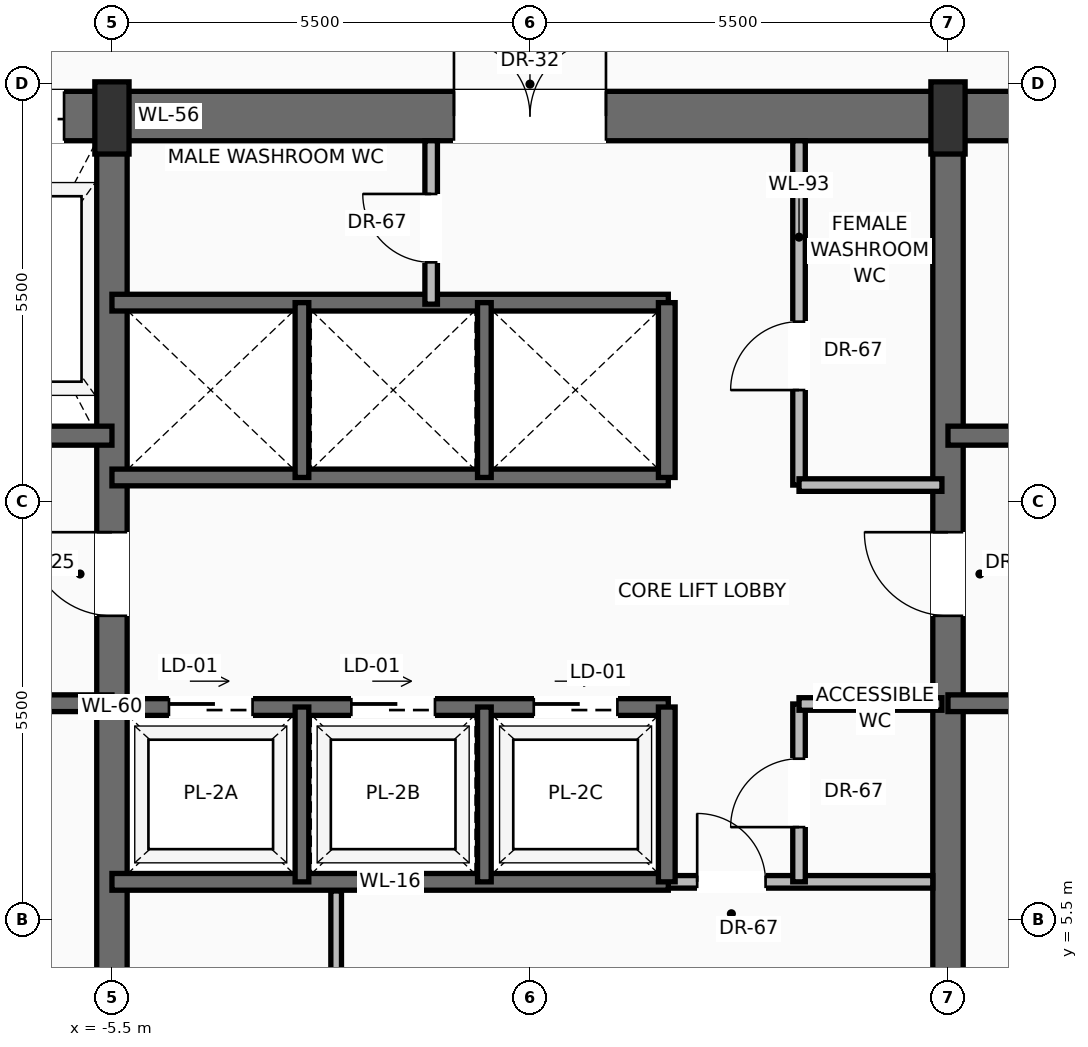
"""IFC4 building model, lengths in metres.
Left out: names, types, materials, properties, quantities, classifications, styles, units other than length and angle.
Written with IfcOpenShell. Run it as: python <this file> out.ifc"""

import sys

from ifc_helpers import new_model, si_unit, direction, frame, frame_2d, origin, origin_2d, place, context, subcontext, project, spatial, rectangle, extrude, source, transform, mapped, element, fill, save


model = new_model("IFC4")
c1 = context("Model", 3, precision=1e-05, world=origin(), true_north=direction((0.0, 1.0)))
c2 = subcontext(c1, "Body", "Model", "MODEL_VIEW")
j1 = project(units=[si_unit("LENGTHUNIT", "METRE"), si_unit("PLANEANGLEUNIT", "RADIAN")], contexts=[c1])
p1 = place(None, origin())
s1 = spatial("IfcSite", under=j1, at=p1, CompositionType="ELEMENT")
p2 = place(p1, origin())
s2 = spatial("IfcBuilding", under=s1, at=p2, CompositionType="ELEMENT")
p3 = place(p2, frame((0.0, 0.0, 129.3)))
s3 = spatial("IfcBuildingStorey", under=s2, at=p3, CompositionType="ELEMENT", Elevation=129.3)
p4 = place(p3, frame((-10.8, 16.075, 0.0), z_axis=(0.0, 0.0, 1.0), x_axis=(1.0, 0.0, 0.0)))
e1 = element("IfcWall", 1, at=p4, inside=s3, PredefinedType="SHEAR", context=c2, shape_type="SweptSolid", body=[
    extrude(rectangle(XDim=21.6, YDim=0.65, at=frame_2d((10.8, 0.0))), origin(), (0.0, 0.0, 1.0), 3.47),
])
p5 = place(p4, frame((3.37, 0.0, 0.0)))
e2 = element("IfcOpeningElement", 2, at=p5, cuts=e1, PredefinedType="OPENING", context=c2, shape_type="SweptSolid", body=[
    extrude(rectangle(XDim=1.3, YDim=2.3, at=frame_2d((0.65, 1.15))), frame((0.0, 0.335, 0.0), z_axis=(0.0, -1.0, 0.0), x_axis=(1.0, 0.0, 0.0)), (0.0, 0.0, 1.0), 0.67),
])
p6 = place(p4, frame((9.8, 0.0, 0.0)))
e3 = element("IfcOpeningElement", 3, at=p6, cuts=e1, PredefinedType="OPENING", context=c2, shape_type="SweptSolid", body=[
    extrude(rectangle(XDim=2.0, YDim=2.4, at=frame_2d((1.0, 1.2))), frame((0.0, 0.335, 0.0), z_axis=(0.0, -1.0, 0.0), x_axis=(1.0, 0.0, 0.0)), (0.0, 0.0, 1.0), 0.67),
])
p7 = place(p3, frame((-5.5, 0.525, 0.0), z_axis=(0.0, 0.0, 1.0), x_axis=(0.0, 1.0, 0.0)))
e4 = element("IfcWall", 4, at=p7, inside=s3, PredefinedType="SHEAR", context=c2, shape_type="SweptSolid", body=[
    extrude(rectangle(XDim=15.55, YDim=0.4, at=frame_2d((7.775, 0.0))), origin(), (0.0, 0.0, 1.0), 3.47),
])
p8 = place(p7, frame((8.975, 0.0, 0.0)))
e5 = element("IfcOpeningElement", 5, at=p8, cuts=e4, PredefinedType="OPENING", context=c2, shape_type="SweptSolid", body=[
    extrude(rectangle(XDim=1.1, YDim=2.2, at=frame_2d((0.55, 1.1))), frame((0.0, 0.21, 0.0), z_axis=(0.0, -1.0, 0.0), x_axis=(1.0, 0.0, 0.0)), (0.0, 0.0, 1.0), 0.42),
])
p9 = place(p3, frame((5.5, 0.525, 0.0), z_axis=(0.0, 0.0, 1.0), x_axis=(0.0, 1.0, 0.0)))
e6 = element("IfcWall", 6, at=p9, inside=s3, PredefinedType="SHEAR", context=c2, shape_type="SweptSolid", body=[
    extrude(rectangle(XDim=15.55, YDim=0.4, at=frame_2d((7.775, 0.0))), origin(), (0.0, 0.0, 1.0), 3.47),
])
p10 = place(p9, frame((8.975, 0.0, 0.0)))
e7 = element("IfcOpeningElement", 7, at=p10, cuts=e6, PredefinedType="OPENING", context=c2, shape_type="SweptSolid", body=[
    extrude(rectangle(XDim=1.1, YDim=2.2, at=frame_2d((0.55, 1.1))), frame((0.0, 0.21, 0.0), z_axis=(0.0, -1.0, 0.0), x_axis=(1.0, 0.0, 0.0)), (0.0, 0.0, 1.0), 0.42),
])
m1 = source(origin(), c2, "Body", "SweptSolid", [
    extrude(rectangle(XDim=0.45, YDim=0.95, at=origin_2d()), origin(), (0.0, 0.0, 1.0), 3.7),
])
for number, where, z_axis, x_axis in (
    (8, (-5.5, 16.05, 0.0), (0.0, 0.0, 1.0), (1.0, 0.0, 0.0)),
    (9, (5.5, 16.05, 0.0), (0.0, 0.0, 1.0), (1.0, 0.0, 0.0)),
):
    element("IfcColumn", number, at=place(p3, frame(where, z_axis=z_axis, x_axis=x_axis)), inside=s3, PredefinedType="PILASTER", context=c2, shape_type="MappedRepresentation", body=[
        mapped(m1, transform((0.0, 0.0, 0.0), scale=1.0)),
    ])
p11 = place(p3, frame((-5.5, 8.35, 0.0), z_axis=(0.0, 0.0, 1.0), x_axis=(-1.0, 0.0, 0.0)))
e10 = element("IfcWall", 10, at=p11, inside=s3, PredefinedType="SOLIDWALL", context=c2, shape_type="SweptSolid", body=[
    extrude(rectangle(XDim=4.65, YDim=0.22, at=frame_2d((2.325, 0.0))), origin(), (0.0, 0.0, 1.0), 3.47),
])
p12 = place(p11, frame((2.5, 0.0, 0.0)))
e11 = element("IfcOpeningElement", 11, at=p12, cuts=e10, PredefinedType="OPENING", context=c2, shape_type="SweptSolid", body=[
    extrude(rectangle(XDim=1.15, YDim=2.2, at=frame_2d((0.575, 1.1))), frame((0.0, 0.12, 0.0), z_axis=(0.0, -1.0, 0.0), x_axis=(1.0, 0.0, 0.0)), (0.0, 0.0, 1.0), 0.24),
])
p13 = place(p3, frame((-5.5, 11.87, 0.0), z_axis=(0.0, 0.0, 1.0), x_axis=(-1.0, 0.0, 0.0)))
e12 = element("IfcWall", 12, at=p13, inside=s3, PredefinedType="SOLIDWALL", context=c2, shape_type="SweptSolid", body=[
    extrude(rectangle(XDim=4.65, YDim=0.25, at=frame_2d((2.325, 0.0))), origin(), (0.0, 0.0, 1.0), 3.47),
])
p14 = place(p13, frame((2.95, 0.0, 0.0)))
e13 = element("IfcOpeningElement", 13, at=p14, cuts=e12, PredefinedType="OPENING", context=c2, shape_type="SweptSolid", body=[
    extrude(rectangle(XDim=1.2, YDim=2.25, at=frame_2d((0.6, 1.125))), frame((0.0, 0.135, 0.0), z_axis=(0.0, -1.0, 0.0), x_axis=(1.0, 0.0, 0.0)), (0.0, 0.0, 1.0), 0.27),
])
p15 = place(p3, frame((10.15, 8.35, 0.0), z_axis=(0.0, 0.0, 1.0), x_axis=(-1.0, 0.0, 0.0)))
e14 = element("IfcWall", 14, at=p15, inside=s3, PredefinedType="SOLIDWALL", context=c2, shape_type="SweptSolid", body=[
    extrude(rectangle(XDim=4.65, YDim=0.22, at=frame_2d((2.325, 0.0))), origin(), (0.0, 0.0, 1.0), 3.47),
])
p16 = place(p15, frame((1.0, 0.0, 0.0)))
e15 = element("IfcOpeningElement", 15, at=p16, cuts=e14, PredefinedType="OPENING", context=c2, shape_type="SweptSolid", body=[
    extrude(rectangle(XDim=1.15, YDim=2.2, at=frame_2d((0.575, 1.1))), frame((0.0, 0.12, 0.0), z_axis=(0.0, -1.0, 0.0), x_axis=(1.0, 0.0, 0.0)), (0.0, 0.0, 1.0), 0.24),
])
p17 = place(p3, frame((10.15, 11.87, 0.0), z_axis=(0.0, 0.0, 1.0), x_axis=(-1.0, 0.0, 0.0)))
e16 = element("IfcWall", 16, at=p17, inside=s3, PredefinedType="SOLIDWALL", context=c2, shape_type="SweptSolid", body=[
    extrude(rectangle(XDim=4.65, YDim=0.25, at=frame_2d((2.325, 0.0))), origin(), (0.0, 0.0, 1.0), 3.47),
])
p18 = place(p17, frame((0.5, 0.0, 0.0)))
e17 = element("IfcOpeningElement", 17, at=p18, cuts=e16, PredefinedType="OPENING", context=c2, shape_type="SweptSolid", body=[
    extrude(rectangle(XDim=1.2, YDim=2.25, at=frame_2d((0.6, 1.125))), frame((0.0, 0.135, 0.0), z_axis=(0.0, -1.0, 0.0), x_axis=(1.0, 0.0, 0.0)), (0.0, 0.0, 1.0), 0.27),
])
p19 = place(p3, frame((1.82, 6.0, 0.0), z_axis=(0.0, 0.0, 1.0), x_axis=(1.0, 0.0, 0.0)))
e18 = element("IfcWall", 18, at=p19, inside=s3, PredefinedType="PARTITIONING", context=c2, shape_type="SweptSolid", body=[
    extrude(rectangle(XDim=3.48, YDim=0.165, at=frame_2d((1.74, 0.0))), origin(), (0.0, 0.0, 1.0), 3.462),
])
p20 = place(p19, frame((0.38, 0.0, 0.0)))
e19 = element("IfcOpeningElement", 19, at=p20, cuts=e18, PredefinedType="OPENING", context=c2, shape_type="SweptSolid", body=[
    extrude(rectangle(XDim=0.9, YDim=2.1, at=frame_2d((0.45, 1.05))), frame((0.0, 0.093, 0.0), z_axis=(0.0, -1.0, 0.0), x_axis=(1.0, 0.0, 0.0)), (0.0, 0.0, 1.0), 0.185),
])
p21 = place(p3, frame((-2.55, 0.85, 0.0), z_axis=(0.0, 0.0, 1.0), x_axis=(0.0, 1.0, 0.0)))
e20 = element("IfcWall", 20, at=p21, inside=s3, PredefinedType="PARTITIONING", context=c2, shape_type="SweptSolid", body=[
    extrude(rectangle(XDim=5.03, YDim=0.14, at=frame_2d((2.515, 0.0))), origin(), (0.0, 0.0, 1.0), 3.462),
])
p22 = place(p21, frame((2.1, 0.0, 0.0)))
e21 = element("IfcOpeningElement", 21, at=p22, cuts=e20, PredefinedType="OPENING", context=c2, shape_type="SweptSolid", body=[
    extrude(rectangle(XDim=0.9, YDim=2.1, at=frame_2d((0.45, 1.05))), frame((0.0, 0.08, 0.0), z_axis=(0.0, -1.0, 0.0), x_axis=(1.0, 0.0, 0.0)), (0.0, 0.0, 1.0), 0.16),
])
p23 = place(p3, frame((3.54, 6.0, 0.0), z_axis=(0.0, 0.0, 1.0), x_axis=(0.0, 1.0, 0.0)))
e22 = element("IfcWall", 22, at=p23, inside=s3, PredefinedType="PARTITIONING", context=c2, shape_type="SweptSolid", body=[
    extrude(rectangle(XDim=2.34, YDim=0.165, at=frame_2d((1.17, 0.0))), origin(), (0.0, 0.0, 1.0), 3.462),
])
p24 = place(p23, frame((0.72, 0.0, 0.0)))
e23 = element("IfcOpeningElement", 23, at=p24, cuts=e22, PredefinedType="OPENING", context=c2, shape_type="SweptSolid", body=[
    extrude(rectangle(XDim=0.9, YDim=2.1, at=frame_2d((0.45, 1.05))), frame((0.0, 0.093, 0.0), z_axis=(0.0, -1.0, 0.0), x_axis=(1.0, 0.0, 0.0)), (0.0, 0.0, 1.0), 0.185),
])
p25 = place(p3, frame((3.54, 8.34, 0.0), z_axis=(0.0, 0.0, 1.0), x_axis=(1.0, 0.0, 0.0)))
e24 = element("IfcWall", 24, at=p25, inside=s3, PredefinedType="PARTITIONING", context=c2, shape_type="SweptSolid", body=[
    extrude(rectangle(XDim=1.88, YDim=0.165, at=frame_2d((0.94, 0.0))), origin(), (0.0, 0.0, 1.0), 3.462),
])
p26 = place(p3, frame((-5.5, 6.0, 0.0), z_axis=(0.0, 0.0, 1.0), x_axis=(1.0, 0.0, 0.0)))
e25 = element("IfcWall", 25, at=p26, inside=s3, PredefinedType="SOLIDWALL", context=c2, shape_type="SweptSolid", body=[
    extrude(rectangle(XDim=7.32, YDim=0.22, at=frame_2d((3.66, 0.0))), origin(), (0.0, 0.0, 1.0), 3.47),
])
p27 = place(p3, frame((-5.5, 8.3, 0.0), z_axis=(0.0, 0.0, 1.0), x_axis=(1.0, 0.0, 0.0)))
e26 = element("IfcWall", 26, at=p27, inside=s3, PredefinedType="SOLIDWALL", context=c2, shape_type="SweptSolid", body=[
    extrude(rectangle(XDim=7.32, YDim=0.22, at=frame_2d((3.66, 0.0))), origin(), (0.0, 0.0, 1.0), 3.47),
])
p28 = place(p27, frame((0.75, 0.0, 0.0)))
e27 = element("IfcOpeningElement", 27, at=p28, cuts=e26, PredefinedType="OPENING", context=c2, shape_type="SweptSolid", body=[
    extrude(rectangle(XDim=1.1, YDim=2.2, at=frame_2d((0.55, 1.1))), frame((0.0, 0.12, 0.0), z_axis=(0.0, -1.0, 0.0), x_axis=(1.0, 0.0, 0.0)), (0.0, 0.0, 1.0), 0.24),
])
p29 = place(p27, frame((3.15, 0.0, 0.0)))
e28 = element("IfcOpeningElement", 28, at=p29, cuts=e26, PredefinedType="OPENING", context=c2, shape_type="SweptSolid", body=[
    extrude(rectangle(XDim=1.1, YDim=2.2, at=frame_2d((0.55, 1.1))), frame((0.0, 0.12, 0.0), z_axis=(0.0, -1.0, 0.0), x_axis=(1.0, 0.0, 0.0)), (0.0, 0.0, 1.0), 0.24),
])
p30 = place(p27, frame((5.55, 0.0, 0.0)))
e29 = element("IfcOpeningElement", 29, at=p30, cuts=e26, PredefinedType="OPENING", context=c2, shape_type="SweptSolid", body=[
    extrude(rectangle(XDim=1.1, YDim=2.2, at=frame_2d((0.55, 1.1))), frame((0.0, 0.12, 0.0), z_axis=(0.0, -1.0, 0.0), x_axis=(1.0, 0.0, 0.0)), (0.0, 0.0, 1.0), 0.24),
])
p31 = place(p3, frame((1.8, 6.0, 0.0), z_axis=(0.0, 0.0, 1.0), x_axis=(0.0, 1.0, 0.0)))
e30 = element("IfcWall", 30, at=p31, inside=s3, PredefinedType="SOLIDWALL", context=c2, shape_type="SweptSolid", body=[
    extrude(rectangle(XDim=2.3, YDim=0.22, at=frame_2d((1.15, 0.0))), origin(), (0.0, 0.0, 1.0), 3.47),
])
for number, where, z_axis, x_axis in (
    (31, (-3.0, 6.0, 0.0), (0.0, 0.0, 1.0), (0.0, 1.0, 0.0)),
    (32, (-0.6, 6.0, 0.0), (0.0, 0.0, 1.0), (0.0, 1.0, 0.0)),
):
    element("IfcWall", number, at=place(p3, frame(where, z_axis=z_axis, x_axis=x_axis)), inside=s3, PredefinedType="SOLIDWALL", context=c2, shape_type="SweptSolid", body=[
        extrude(rectangle(XDim=2.3, YDim=0.18, at=frame_2d((1.15, 0.0))), origin(), (0.0, 0.0, 1.0), 3.47),
    ])
for number, where, z_axis, x_axis in (
    (33, (-5.5, 11.32, 0.0), (0.0, 0.0, 1.0), (1.0, 0.0, 0.0)),
    (34, (-5.5, 13.62, 0.0), (0.0, 0.0, 1.0), (1.0, 0.0, 0.0)),
):
    element("IfcWall", number, at=place(p3, frame(where, z_axis=z_axis, x_axis=x_axis)), inside=s3, PredefinedType="SOLIDWALL", context=c2, shape_type="SweptSolid", body=[
        extrude(rectangle(XDim=7.32, YDim=0.22, at=frame_2d((3.66, 0.0))), origin(), (0.0, 0.0, 1.0), 3.47),
    ])
p32 = place(p3, frame((1.8, 11.32, 0.0), z_axis=(0.0, 0.0, 1.0), x_axis=(0.0, 1.0, 0.0)))
e35 = element("IfcWall", 35, at=p32, inside=s3, PredefinedType="SOLIDWALL", context=c2, shape_type="SweptSolid", body=[
    extrude(rectangle(XDim=2.3, YDim=0.22, at=frame_2d((1.15, 0.0))), origin(), (0.0, 0.0, 1.0), 3.47),
])
for number, where, z_axis, x_axis in (
    (36, (-3.0, 11.32, 0.0), (0.0, 0.0, 1.0), (0.0, 1.0, 0.0)),
    (37, (-0.6, 11.32, 0.0), (0.0, 0.0, 1.0), (0.0, 1.0, 0.0)),
):
    element("IfcWall", number, at=place(p3, frame(where, z_axis=z_axis, x_axis=x_axis)), inside=s3, PredefinedType="SOLIDWALL", context=c2, shape_type="SweptSolid", body=[
        extrude(rectangle(XDim=2.3, YDim=0.18, at=frame_2d((1.15, 0.0))), origin(), (0.0, 0.0, 1.0), 3.47),
    ])
p33 = place(p3, frame((-1.3, 13.6, 0.0), z_axis=(0.0, 0.0, 1.0), x_axis=(0.0, 1.0, 0.0)))
e38 = element("IfcWall", 38, at=p33, inside=s3, PredefinedType="PARTITIONING", context=c2, shape_type="SweptSolid", body=[
    extrude(rectangle(XDim=2.15, YDim=0.165, at=frame_2d((1.075, 0.0))), origin(), (0.0, 0.0, 1.0), 3.462),
])
p34 = place(p33, frame((0.55, 0.0, 0.0)))
e39 = element("IfcOpeningElement", 39, at=p34, cuts=e38, PredefinedType="OPENING", context=c2, shape_type="SweptSolid", body=[
    extrude(rectangle(XDim=0.9, YDim=2.1, at=frame_2d((0.45, 1.05))), frame((0.0, 0.093, 0.0), z_axis=(0.0, -1.0, 0.0), x_axis=(1.0, 0.0, 0.0)), (0.0, 0.0, 1.0), 0.185),
])
p35 = place(p3, frame((3.54, 11.22, 0.0), z_axis=(0.0, 0.0, 1.0), x_axis=(0.0, 1.0, 0.0)))
e40 = element("IfcWall", 40, at=p35, inside=s3, PredefinedType="PARTITIONING", context=c2, shape_type="SweptSolid", body=[
    extrude(rectangle(XDim=4.53, YDim=0.165, at=frame_2d((2.265, 0.0))), origin(), (0.0, 0.0, 1.0), 3.462),
])
p36 = place(p35, frame((1.25, 0.0, 0.0)))
e41 = element("IfcOpeningElement", 41, at=p36, cuts=e40, PredefinedType="OPENING", context=c2, shape_type="SweptSolid", body=[
    extrude(rectangle(XDim=0.9, YDim=2.1, at=frame_2d((0.45, 1.05))), frame((0.0, 0.093, 0.0), z_axis=(0.0, -1.0, 0.0), x_axis=(1.0, 0.0, 0.0)), (0.0, 0.0, 1.0), 0.185),
])
p37 = place(p3, frame((3.54, 11.22, 0.0), z_axis=(0.0, 0.0, 1.0), x_axis=(1.0, 0.0, 0.0)))
e42 = element("IfcWall", 42, at=p37, inside=s3, PredefinedType="PARTITIONING", context=c2, shape_type="SweptSolid", body=[
    extrude(rectangle(XDim=1.88, YDim=0.165, at=frame_2d((0.94, 0.0))), origin(), (0.0, 0.0, 1.0), 3.462),
])
m2 = source(origin(), c2, "Body", "SweptSolid", [
    extrude(rectangle(XDim=1.1, YDim=2.2, at=frame_2d((0.55, 1.1))), frame((0.0, 0.025, 0.0), z_axis=(0.0, -1.0, 0.0), x_axis=(1.0, 0.0, 0.0)), (0.0, 0.0, 1.0), 0.05),
])
p38 = place(p8, origin())
e43 = element("IfcDoor", 43, at=p38, inside=s3, OperationType="SINGLE_SWING_RIGHT", PredefinedType="DOOR", context=c2, shape_type="MappedRepresentation", body=[
    mapped(m2, transform((0.0, 0.0, 0.0), scale=1.0)),
])
fill(e5, e43)
m3 = source(origin(), c2, "Body", "SweptSolid", [
    extrude(rectangle(XDim=1.3, YDim=2.3, at=frame_2d((0.65, 1.15))), frame((0.0, 0.025, 0.0), z_axis=(0.0, -1.0, 0.0), x_axis=(1.0, 0.0, 0.0)), (0.0, 0.0, 1.0), 0.05),
])
p39 = place(p5, origin())
e44 = element("IfcDoor", 44, at=p39, inside=s3, OperationType="SLIDING_TO_RIGHT", PredefinedType="DOOR", context=c2, shape_type="MappedRepresentation", body=[
    mapped(m3, transform((0.0, 0.0, 0.0), scale=1.0)),
])
fill(e2, e44)
p40 = place(p10, origin())
e45 = element("IfcDoor", 45, at=p40, inside=s3, OperationType="SINGLE_SWING_RIGHT", PredefinedType="DOOR", context=c2, shape_type="MappedRepresentation", body=[
    mapped(m2, transform((0.0, 0.0, 0.0), scale=1.0)),
])
fill(e7, e45)
m4 = source(origin(), c2, "Body", "SweptSolid", [
    extrude(rectangle(XDim=2.0, YDim=2.4, at=frame_2d((1.0, 1.2))), frame((0.0, 0.025, 0.0), z_axis=(0.0, -1.0, 0.0), x_axis=(1.0, 0.0, 0.0)), (0.0, 0.0, 1.0), 0.05),
])
p41 = place(p6, origin())
e46 = element("IfcDoor", 46, at=p41, inside=s3, OperationType="DOUBLE_DOOR_SINGLE_SWING", PredefinedType="DOOR", context=c2, shape_type="MappedRepresentation", body=[
    mapped(m4, transform((0.0, 0.0, 0.0), scale=1.0)),
])
fill(e3, e46)
m5 = source(origin(), c2, "Body", "SweptSolid", [
    extrude(rectangle(XDim=0.9, YDim=2.1, at=frame_2d((0.45, 1.05))), frame((0.0, 0.025, 0.0), z_axis=(0.0, -1.0, 0.0), x_axis=(1.0, 0.0, 0.0)), (0.0, 0.0, 1.0), 0.05),
])
p42 = place(p20, origin())
e47 = element("IfcDoor", 47, at=p42, inside=s3, OperationType="SINGLE_SWING_LEFT", PredefinedType="DOOR", context=c2, shape_type="MappedRepresentation", body=[
    mapped(m5, transform((0.0, 0.0, 0.0), scale=1.0)),
])
fill(e19, e47)
p43 = place(p24, origin())
e48 = element("IfcDoor", 48, at=p43, inside=s3, OperationType="SINGLE_SWING_LEFT", PredefinedType="DOOR", context=c2, shape_type="MappedRepresentation", body=[
    mapped(m5, transform((0.0, 0.0, 0.0), scale=1.0)),
])
fill(e23, e48)
m6 = source(origin(), c2, "Body", "SweptSolid", [
    extrude(rectangle(XDim=1.1, YDim=2.2, at=frame_2d((0.55, 1.1))), frame((0.0, 0.025, 0.0), z_axis=(0.0, -1.0, 0.0), x_axis=(1.0, 0.0, 0.0)), (0.0, 0.0, 1.0), 0.05),
])
p44 = place(p28, origin())
e49 = element("IfcDoor", 49, at=p44, inside=s3, OperationType="SLIDING_TO_LEFT", PredefinedType="DOOR", context=c2, shape_type="MappedRepresentation", body=[
    mapped(m6, transform((0.0, 0.0, 0.0), scale=1.0)),
])
fill(e27, e49)
p45 = place(p29, origin())
e50 = element("IfcDoor", 50, at=p45, inside=s3, OperationType="SLIDING_TO_LEFT", PredefinedType="DOOR", context=c2, shape_type="MappedRepresentation", body=[
    mapped(m6, transform((0.0, 0.0, 0.0), scale=1.0)),
])
fill(e28, e50)
p46 = place(p30, origin())
e51 = element("IfcDoor", 51, at=p46, inside=s3, OperationType="SLIDING_TO_LEFT", PredefinedType="DOOR", context=c2, shape_type="MappedRepresentation", body=[
    mapped(m6, transform((0.0, 0.0, 0.0), scale=1.0)),
])
fill(e29, e51)
p47 = place(p34, origin())
e52 = element("IfcDoor", 52, at=p47, inside=s3, OperationType="SINGLE_SWING_RIGHT", PredefinedType="DOOR", context=c2, shape_type="MappedRepresentation", body=[
    mapped(m5, transform((0.0, 0.0, 0.0), scale=1.0)),
])
fill(e39, e52)
p48 = place(p36, origin())
e53 = element("IfcDoor", 53, at=p48, inside=s3, OperationType="SINGLE_SWING_LEFT", PredefinedType="DOOR", context=c2, shape_type="MappedRepresentation", body=[
    mapped(m5, transform((0.0, 0.0, 0.0), scale=1.0)),
])
fill(e41, e53)
save(model, sys.argv[1])
